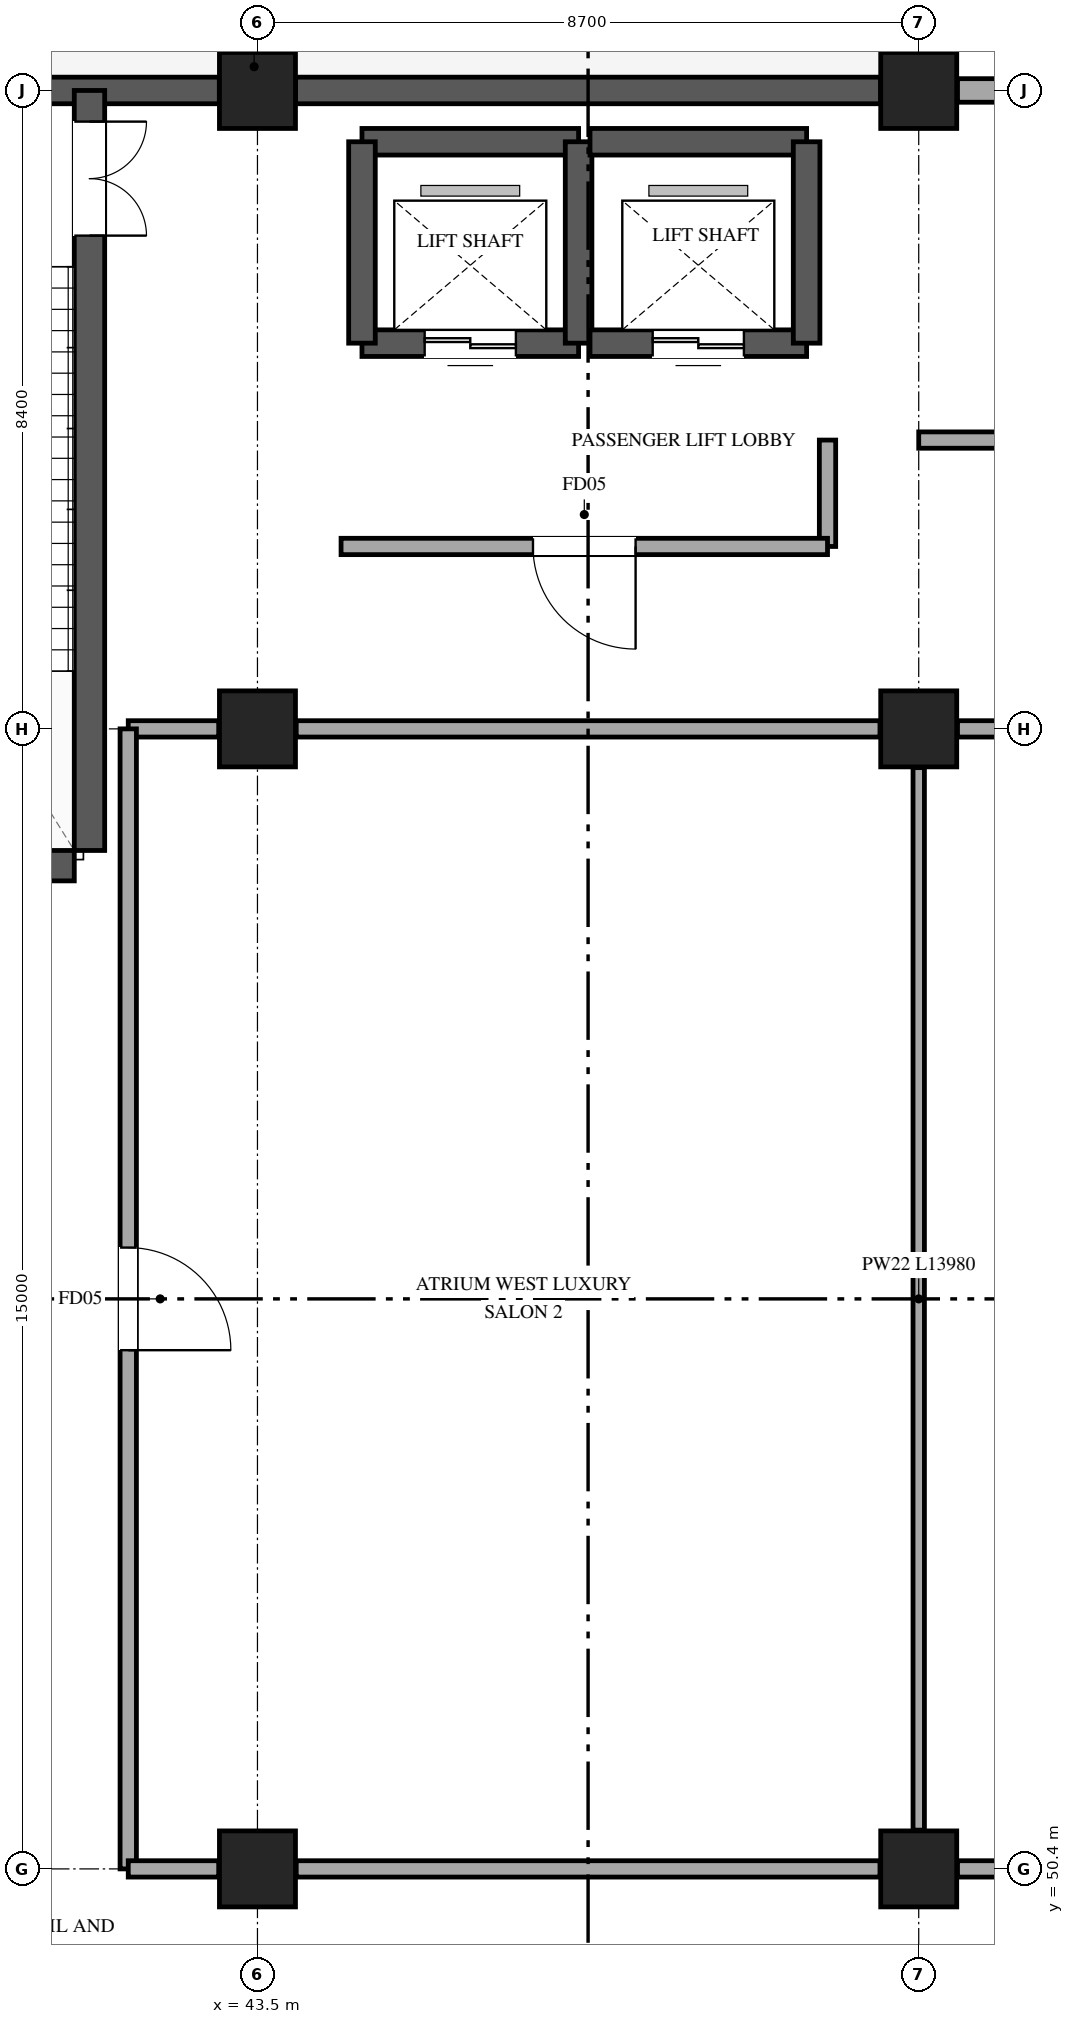
"""IFC4 building model, lengths in metres.
Left out: names, types, materials, properties, quantities, classifications, styles, units other than length and angle.
Written with IfcOpenShell. Run it as: python <this file> out.ifc"""

import sys

from ifc_helpers import new_model, si_unit, direction, frame, frame_2d, origin, origin_2d, place, context, subcontext, project, spatial, rectangle, extrude, element, fill, save


model = new_model("IFC4")
c1 = context("Model", 3, precision=1e-05, world=origin(), true_north=direction((0.0, 1.0)))
c2 = subcontext(c1, "Body", "Model", "MODEL_VIEW")
j1 = project(units=[si_unit("LENGTHUNIT", "METRE"), si_unit("PLANEANGLEUNIT", "RADIAN")], contexts=[c1])
p1 = place(None, origin())
s1 = spatial("IfcSite", under=j1, at=p1, CompositionType="ELEMENT")
p2 = place(p1, origin())
s2 = spatial("IfcBuilding", under=s1, at=p2, CompositionType="ELEMENT")
p3 = place(p2, origin())
s3 = spatial("IfcBuildingStorey", under=s2, at=p3, CompositionType="ELEMENT", Elevation=0.0)
for number, where, z_axis, x_axis in (
    (1, (43.5, 50.4, 0.0), (0.0, 0.0, 1.0), (1.0, 0.0, 0.0)),
    (2, (43.5, 65.4, 0.0), (0.0, 0.0, 1.0), (1.0, 0.0, 0.0)),
    (3, (43.5, 73.8, 0.0), (0.0, 0.0, 1.0), (1.0, 0.0, 0.0)),
    (4, (52.2, 50.4, 0.0), (0.0, 0.0, 1.0), (1.0, 0.0, 0.0)),
    (5, (52.2, 65.4, 0.0), (0.0, 0.0, 1.0), (1.0, 0.0, 0.0)),
    (6, (52.2, 73.8, 0.0), (0.0, 0.0, 1.0), (1.0, 0.0, 0.0)),
):
    element("IfcColumn", number, at=place(p3, frame(where, z_axis=z_axis, x_axis=x_axis)), inside=s3, PredefinedType="COLUMN", context=c2, shape_type="SweptSolid", body=[
        extrude(rectangle(XDim=1.0, YDim=1.0, at=origin_2d()), origin(), (0.0, 0.0, 1.0), 6.0),
    ])
p4 = place(p3, frame((35.302, 73.8, 0.0), z_axis=(0.0, 0.0, 1.0), x_axis=(1.0, 0.0, 0.0)))
e7 = element("IfcWall", 7, at=p4, inside=s3, PredefinedType="STANDARD", context=c2, shape_type="SweptSolid", body=[
    extrude(rectangle(XDim=7.696, YDim=0.35, at=frame_2d((3.848, 0.0))), origin(), (0.0, 0.0, 1.0), 5.66),
])
p5 = place(p4, frame((1.793, 0.0, 0.0)))
e8 = element("IfcOpeningElement", 8, at=p5, cuts=e7, PredefinedType="OPENING", context=c2, shape_type="SweptSolid", body=[
    extrude(rectangle(XDim=3.2, YDim=2.4, at=frame_2d((1.6, 1.2))), frame((0.0, 0.185, 0.0), z_axis=(0.0, -1.0, 0.0), x_axis=(1.0, 0.0, 0.0)), (0.0, 0.0, 1.0), 0.37),
])
p6 = place(p3, frame((44.002, 73.8, 0.0), z_axis=(0.0, 0.0, 1.0), x_axis=(1.0, 0.0, 0.0)))
e9 = element("IfcWall", 9, at=p6, inside=s3, PredefinedType="STANDARD", context=c2, shape_type="SweptSolid", body=[
    extrude(rectangle(XDim=7.696, YDim=0.35, at=frame_2d((3.848, 0.0))), origin(), (0.0, 0.0, 1.0), 5.66),
])
p7 = place(p3, frame((41.29, 73.8, 0.0), z_axis=(0.0, 0.0, 1.0), x_axis=(0.0, -1.0, 0.0)))
e10 = element("IfcWall", 10, at=p7, inside=s3, PredefinedType="SHEAR", context=c2, shape_type="SweptSolid", body=[
    extrude(rectangle(XDim=10.0, YDim=0.4, at=frame_2d((5.0, 0.0))), origin(), (0.0, 0.0, 1.0), 6.0),
])
p8 = place(p7, frame((0.41, 0.0, 0.0)))
e11 = element("IfcOpeningElement", 11, at=p8, cuts=e10, PredefinedType="OPENING", context=c2, shape_type="SweptSolid", body=[
    extrude(rectangle(XDim=1.5, YDim=2.2, at=frame_2d((0.75, 1.1))), frame((0.0, 0.21, 0.0), z_axis=(0.0, -1.0, 0.0), x_axis=(1.0, 0.0, 0.0)), (0.0, 0.0, 1.0), 0.42),
])
p9 = place(p3, frame((41.09, 63.6, 0.0), z_axis=(0.0, 0.0, 1.0), x_axis=(-1.0, 0.0, 0.0)))
e12 = element("IfcWall", 12, at=p9, inside=s3, PredefinedType="SHEAR", context=c2, shape_type="SweptSolid", body=[
    extrude(rectangle(XDim=4.79, YDim=0.4, at=frame_2d((2.395, 0.0))), origin(), (0.0, 0.0, 1.0), 6.0),
])
p10 = place(p3, frame((44.875, 73.125, 0.0), z_axis=(0.0, 0.0, 1.0), x_axis=(1.0, 0.0, 0.0)))
e13 = element("IfcWall", 13, at=p10, inside=s3, PredefinedType="SHEAR", context=c2, shape_type="SweptSolid", body=[
    extrude(rectangle(XDim=2.85, YDim=0.35, at=frame_2d((1.425, 0.0))), origin(), (0.0, 0.0, 1.0), 6.0),
])
p11 = place(p3, frame((47.725, 70.475, 0.0), z_axis=(0.0, 0.0, 1.0), x_axis=(-1.0, 0.0, 0.0)))
e14 = element("IfcWall", 14, at=p11, inside=s3, PredefinedType="SHEAR", context=c2, shape_type="SweptSolid", body=[
    extrude(rectangle(XDim=2.85, YDim=0.35, at=frame_2d((1.425, 0.0))), origin(), (0.0, 0.0, 1.0), 6.0),
])
p12 = place(p11, frame((0.825, 0.0, 0.0)))
e15 = element("IfcOpeningElement", 15, at=p12, cuts=e14, PredefinedType="OPENING", context=c2, shape_type="SweptSolid", body=[
    extrude(rectangle(XDim=1.2, YDim=2.2, at=frame_2d((0.6, 1.1))), frame((0.0, 0.185, 0.0), z_axis=(0.0, -1.0, 0.0), x_axis=(1.0, 0.0, 0.0)), (0.0, 0.0, 1.0), 0.37),
])
for number, where, z_axis, x_axis in (
    (16, (44.875, 70.475, 0.0), (0.0, 0.0, 1.0), (0.0, 1.0, 0.0)),
    (17, (47.725, 73.125, 0.0), (0.0, 0.0, 1.0), (0.0, -1.0, 0.0)),
):
    element("IfcWall", number, at=place(p3, frame(where, z_axis=z_axis, x_axis=x_axis)), inside=s3, PredefinedType="SHEAR", context=c2, shape_type="SweptSolid", body=[
        extrude(rectangle(XDim=2.65, YDim=0.35, at=frame_2d((1.325, 0.0))), origin(), (0.0, 0.0, 1.0), 6.0),
    ])
p13 = place(p3, frame((47.875, 73.125, 0.0), z_axis=(0.0, 0.0, 1.0), x_axis=(1.0, 0.0, 0.0)))
e18 = element("IfcWall", 18, at=p13, inside=s3, PredefinedType="SHEAR", context=c2, shape_type="SweptSolid", body=[
    extrude(rectangle(XDim=2.85, YDim=0.35, at=frame_2d((1.425, 0.0))), origin(), (0.0, 0.0, 1.0), 6.0),
])
p14 = place(p3, frame((50.725, 70.475, 0.0), z_axis=(0.0, 0.0, 1.0), x_axis=(-1.0, 0.0, 0.0)))
e19 = element("IfcWall", 19, at=p14, inside=s3, PredefinedType="SHEAR", context=c2, shape_type="SweptSolid", body=[
    extrude(rectangle(XDim=2.85, YDim=0.35, at=frame_2d((1.425, 0.0))), origin(), (0.0, 0.0, 1.0), 6.0),
])
p15 = place(p14, frame((0.825, 0.0, 0.0)))
e20 = element("IfcOpeningElement", 20, at=p15, cuts=e19, PredefinedType="OPENING", context=c2, shape_type="SweptSolid", body=[
    extrude(rectangle(XDim=1.2, YDim=2.2, at=frame_2d((0.6, 1.1))), frame((0.0, 0.185, 0.0), z_axis=(0.0, -1.0, 0.0), x_axis=(1.0, 0.0, 0.0)), (0.0, 0.0, 1.0), 0.37),
])
p16 = place(p3, frame((50.725, 73.125, 0.0), z_axis=(0.0, 0.0, 1.0), x_axis=(0.0, -1.0, 0.0)))
e21 = element("IfcWall", 21, at=p16, inside=s3, PredefinedType="SHEAR", context=c2, shape_type="SweptSolid", body=[
    extrude(rectangle(XDim=2.65, YDim=0.35, at=frame_2d((1.325, 0.0))), origin(), (0.0, 0.0, 1.0), 6.0),
])
p17 = place(p3, frame((51.0, 69.2, 0.0), z_axis=(0.0, 0.0, 1.0), x_axis=(0.0, -1.0, 0.0)))
e22 = element("IfcWall", 22, at=p17, inside=s3, PredefinedType="PARTITIONING", context=c2, shape_type="SweptSolid", body=[
    extrude(rectangle(XDim=1.4, YDim=0.215, at=frame_2d((0.7, 0.0))), origin(), (0.0, 0.0, 1.0), 5.66),
])
p18 = place(p3, frame((51.0, 67.8, 0.0), z_axis=(0.0, 0.0, 1.0), x_axis=(-1.0, 0.0, 0.0)))
e23 = element("IfcWall", 23, at=p18, inside=s3, PredefinedType="PARTITIONING", context=c2, shape_type="SweptSolid", body=[
    extrude(rectangle(XDim=6.4, YDim=0.215, at=frame_2d((3.2, 0.0))), origin(), (0.0, 0.0, 1.0), 5.66),
])
p19 = place(p18, frame((2.525, 0.0, 0.0)))
e24 = element("IfcOpeningElement", 24, at=p19, cuts=e23, PredefinedType="OPENING", context=c2, shape_type="SweptSolid", body=[
    extrude(rectangle(XDim=1.35, YDim=2.2, at=frame_2d((0.675, 1.1))), frame((0.0, 0.118, 0.0), z_axis=(0.0, -1.0, 0.0), x_axis=(1.0, 0.0, 0.0)), (0.0, 0.0, 1.0), 0.235),
])
p20 = place(p3, frame((52.71, 50.4, 0.0), z_axis=(0.0, 0.0, 1.0), x_axis=(1.0, 0.0, 0.0)))
e25 = element("IfcWall", 25, at=p20, inside=s3, PredefinedType="PARTITIONING", context=c2, shape_type="SweptSolid", body=[
    extrude(rectangle(XDim=7.68, YDim=0.215, at=frame_2d((3.84, 0.0))), origin(), (0.0, 0.0, 1.0), 4.51),
])
for number, where, z_axis, x_axis in (
    (26, (60.39, 65.4, 0.0), (0.0, 0.0, 1.0), (-1.0, 0.0, 0.0)),
    (27, (51.69, 65.4, 0.0), (0.0, 0.0, 1.0), (-1.0, 0.0, 0.0)),
):
    element("IfcWall", number, at=place(p3, frame(where, z_axis=z_axis, x_axis=x_axis)), inside=s3, PredefinedType="PARTITIONING", context=c2, shape_type="SweptSolid", body=[
        extrude(rectangle(XDim=7.68, YDim=0.215, at=frame_2d((3.84, 0.0))), origin(), (0.0, 0.0, 1.0), 4.91),
    ])
p21 = place(p3, frame((42.99, 65.4, 0.0), z_axis=(0.0, 0.0, 1.0), x_axis=(-1.0, 0.0, 0.0)))
e28 = element("IfcWall", 28, at=p21, inside=s3, PredefinedType="PARTITIONING", context=c2, shape_type="SweptSolid", body=[
    extrude(rectangle(XDim=1.19, YDim=0.215, at=frame_2d((0.595, 0.0))), origin(), (0.0, 0.0, 1.0), 5.66),
])
p22 = place(p3, frame((41.8, 65.4, 0.0), z_axis=(0.0, 0.0, 1.0), x_axis=(0.0, -1.0, 0.0)))
e29 = element("IfcWall", 29, at=p22, inside=s3, PredefinedType="PARTITIONING", context=c2, shape_type="SweptSolid", body=[
    extrude(rectangle(XDim=15.0, YDim=0.215, at=frame_2d((7.5, 0.0))), origin(), (0.0, 0.0, 1.0), 4.91),
])
p23 = place(p22, frame((6.825, 0.0, 0.0)))
e30 = element("IfcOpeningElement", 30, at=p23, cuts=e29, PredefinedType="OPENING", context=c2, shape_type="SweptSolid", body=[
    extrude(rectangle(XDim=1.35, YDim=2.2, at=frame_2d((0.675, 1.1))), frame((0.0, 0.118, 0.0), z_axis=(0.0, -1.0, 0.0), x_axis=(1.0, 0.0, 0.0)), (0.0, 0.0, 1.0), 0.235),
])
p24 = place(p3, frame((41.8, 50.4, 0.0), z_axis=(0.0, 0.0, 1.0), x_axis=(1.0, 0.0, 0.0)))
e31 = element("IfcWall", 31, at=p24, inside=s3, PredefinedType="PARTITIONING", context=c2, shape_type="SweptSolid", body=[
    extrude(rectangle(XDim=1.19, YDim=0.215, at=frame_2d((0.595, 0.0))), origin(), (0.0, 0.0, 1.0), 4.91),
])
p25 = place(p3, frame((44.01, 50.4, 0.0), z_axis=(0.0, 0.0, 1.0), x_axis=(1.0, 0.0, 0.0)))
e32 = element("IfcWall", 32, at=p25, inside=s3, PredefinedType="PARTITIONING", context=c2, shape_type="SweptSolid", body=[
    extrude(rectangle(XDim=7.68, YDim=0.215, at=frame_2d((3.84, 0.0))), origin(), (0.0, 0.0, 1.0), 4.91),
])
p26 = place(p3, frame((52.2, 69.2, 0.0), z_axis=(0.0, 0.0, 1.0), x_axis=(1.0, 0.0, 0.0)))
e33 = element("IfcWall", 33, at=p26, inside=s3, PredefinedType="PARTITIONING", context=c2, shape_type="SweptSolid", body=[
    extrude(rectangle(XDim=36.0, YDim=0.215, at=frame_2d((18.0, 0.0))), origin(), (0.0, 0.0, 1.0), 4.91),
])
p27 = place(p26, frame((17.325, 0.0, 0.0)))
e34 = element("IfcOpeningElement", 34, at=p27, cuts=e33, PredefinedType="OPENING", context=c2, shape_type="SweptSolid", body=[
    extrude(rectangle(XDim=1.35, YDim=2.2, at=frame_2d((0.675, 1.1))), frame((0.0, 0.118, 0.0), z_axis=(0.0, -1.0, 0.0), x_axis=(1.0, 0.0, 0.0)), (0.0, 0.0, 1.0), 0.235),
])
p28 = place(p3, frame((52.2, 50.91, 0.0), z_axis=(0.0, 0.0, 1.0), x_axis=(0.0, 1.0, 0.0)))
e35 = element("IfcWall", 35, at=p28, inside=s3, PredefinedType="PARTITIONING", context=c2, shape_type="SweptSolid", body=[
    extrude(rectangle(XDim=13.98, YDim=0.15, at=frame_2d((6.99, 0.0))), origin(), (0.0, 0.0, 1.0), 5.222),
])
p29 = place(p3, frame((52.71, 73.8, 0.0), z_axis=(0.0, 0.0, 1.0), x_axis=(1.0, 0.0, 0.0)))
e36 = element("IfcWall", 36, at=p29, inside=s3, PredefinedType="STANDARD", context=c2, shape_type="SweptSolid", body=[
    extrude(rectangle(XDim=7.68, YDim=0.31, at=frame_2d((3.84, 0.0))), origin(), (0.0, 0.0, 1.0), 4.91),
])
p30 = place(p8, origin())
e37 = element("IfcDoor", 37, at=p30, inside=s3, OperationType="DOUBLE_DOOR_SINGLE_SWING", PredefinedType="DOOR", context=c2, shape_type="SweptSolid", body=[
    extrude(rectangle(XDim=1.5, YDim=2.2, at=frame_2d((0.75, 1.1))), frame((0.0, 0.025, 0.0), z_axis=(0.0, -1.0, 0.0), x_axis=(1.0, 0.0, 0.0)), (0.0, 0.0, 1.0), 0.05),
])
fill(e11, e37)
p31 = place(p12, origin())
e38 = element("IfcDoor", 38, at=p31, inside=s3, OperationType="DOUBLE_DOOR_SLIDING", PredefinedType="DOOR", context=c2, shape_type="SweptSolid", body=[
    extrude(rectangle(XDim=1.2, YDim=2.2, at=frame_2d((0.6, 1.1))), frame((0.0, 0.025, 0.0), z_axis=(0.0, -1.0, 0.0), x_axis=(1.0, 0.0, 0.0)), (0.0, 0.0, 1.0), 0.05),
])
fill(e15, e38)
p32 = place(p15, origin())
e39 = element("IfcDoor", 39, at=p32, inside=s3, OperationType="DOUBLE_DOOR_SLIDING", PredefinedType="DOOR", context=c2, shape_type="SweptSolid", body=[
    extrude(rectangle(XDim=1.2, YDim=2.2, at=frame_2d((0.6, 1.1))), frame((0.0, 0.025, 0.0), z_axis=(0.0, -1.0, 0.0), x_axis=(1.0, 0.0, 0.0)), (0.0, 0.0, 1.0), 0.05),
])
fill(e20, e39)
p33 = place(p19, origin())
e40 = element("IfcDoor", 40, at=p33, inside=s3, OperationType="SINGLE_SWING_LEFT", PredefinedType="DOOR", context=c2, shape_type="SweptSolid", body=[
    extrude(rectangle(XDim=1.35, YDim=2.2, at=frame_2d((0.675, 1.1))), frame((0.0, 0.025, 0.0), z_axis=(0.0, -1.0, 0.0), x_axis=(1.0, 0.0, 0.0)), (0.0, 0.0, 1.0), 0.05),
])
fill(e24, e40)
p34 = place(p23, origin())
e41 = element("IfcDoor", 41, at=p34, inside=s3, OperationType="SINGLE_SWING_RIGHT", PredefinedType="DOOR", context=c2, shape_type="SweptSolid", body=[
    extrude(rectangle(XDim=1.35, YDim=2.2, at=frame_2d((0.675, 1.1))), frame((0.0, 0.025, 0.0), z_axis=(0.0, -1.0, 0.0), x_axis=(1.0, 0.0, 0.0)), (0.0, 0.0, 1.0), 0.05),
])
fill(e30, e41)
save(model, sys.argv[1])
